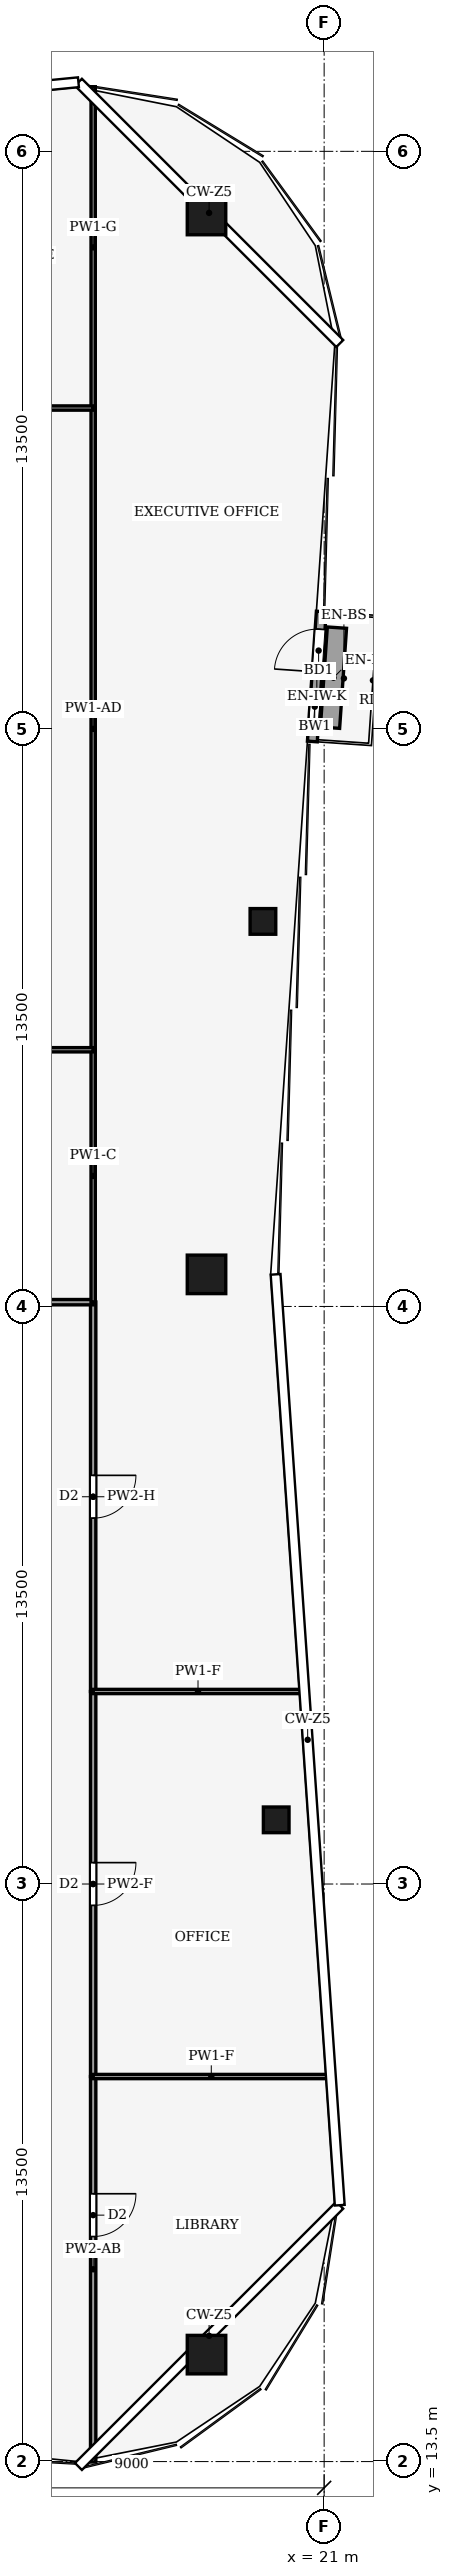
"""IFC4 building model, lengths in metres.
Left out: names, types, materials, properties, quantities, classifications, styles, units other than length and angle.
Written with IfcOpenShell. Run it as: python <this file> out.ifc"""

import sys

from ifc_helpers import new_model, si_unit, direction, frame, frame_2d, origin, origin_2d, place, context, subcontext, project, spatial, rectangle, hollow_rectangle, extrude, element, fill, save


model = new_model("IFC4")
c1 = context("Model", 3, precision=1e-05, world=origin(), true_north=direction((0.0, 1.0)))
c2 = subcontext(c1, "Body", "Model", "MODEL_VIEW")
j1 = project(units=[si_unit("LENGTHUNIT", "METRE"), si_unit("PLANEANGLEUNIT", "RADIAN")], contexts=[c1])
p1 = place(None, origin())
s1 = spatial("IfcSite", under=j1, at=p1, CompositionType="ELEMENT")
p2 = place(p1, origin())
s2 = spatial("IfcBuilding", under=s1, at=p2, CompositionType="ELEMENT")
p3 = place(p2, frame((0.0, 0.0, 322.0)))
s3 = spatial("IfcBuildingStorey", under=s2, at=p3, CompositionType="ELEMENT", Elevation=322.0)
for number, where, z_axis, x_axis in (
    (1, (18.25, 66.0, 0.0), (0.0, 0.0, 1.0), (1.0, 0.0, 0.0)),
    (2, (18.25, 41.25, 0.0), (0.0, 0.0, 1.0), (1.0, 0.0, 0.0)),
    (3, (18.25, 16.0, 0.0), (0.0, 0.0, 1.0), (1.0, 0.0, 0.0)),
):
    element("IfcColumn", number, at=place(p3, frame(where, z_axis=z_axis, x_axis=x_axis)), inside=s3, PredefinedType="COLUMN", context=c2, shape_type="SweptSolid", body=[
        extrude(hollow_rectangle(XDim=0.9, YDim=0.9, WallThickness=0.04, at=origin_2d()), origin(), (0.0, 0.0, 1.0), 4.0),
    ])
for number, where, z_axis, x_axis in (
    (4, (19.879, 28.5, 0.0), (0.0, 0.0, 1.0), (1.0, 0.0, 0.0)),
    (5, (19.569, 49.5, 0.0), (0.0, 0.0, 1.0), (1.0, 0.0, 0.0)),
):
    element("IfcColumn", number, at=place(p3, frame(where, z_axis=z_axis, x_axis=x_axis)), inside=s3, PredefinedType="COLUMN", context=c2, shape_type="SweptSolid", body=[
        extrude(hollow_rectangle(XDim=0.6, YDim=0.6, WallThickness=0.025, at=origin_2d()), origin(), (0.0, 0.0, 1.0), 4.0),
    ])
p4 = place(p3, frame((20.724, 53.706, 0.0), z_axis=(0.0, 0.0, 1.0), x_axis=(0.068802091615, 0.997630328423, 0.0)))
e6 = element("IfcWall", 6, at=p4, inside=s3, PredefinedType="SOLIDWALL", context=c2, shape_type="SweptSolid", body=[
    extrude(rectangle(XDim=3.045, YDim=0.23, at=frame_2d((1.522, 0.0))), origin(), (0.0, 0.0, 1.0), 3.65),
])
p5 = place(p4, frame((1.63, 0.0, 0.0)))
e7 = element("IfcOpeningElement", 7, at=p5, cuts=e6, PredefinedType="OPENING", context=c2, shape_type="SweptSolid", body=[
    extrude(rectangle(XDim=1.0, YDim=2.1, at=frame_2d((0.5, 1.05))), frame((0.0, 0.125, 0.0), z_axis=(0.0, -1.0, 0.0), x_axis=(1.0, 0.0, 0.0)), (0.0, 0.0, 1.0), 0.25),
])
p6 = place(p4, frame((0.415, 0.0, 0.9)))
e8 = element("IfcOpeningElement", 8, at=p6, cuts=e6, PredefinedType="OPENING", context=c2, shape_type="SweptSolid", body=[
    extrude(rectangle(XDim=0.8, YDim=1.2, at=frame_2d((0.4, 0.6))), frame((0.0, 0.125, 0.0), z_axis=(0.0, -1.0, 0.0), x_axis=(1.0, 0.0, 0.0)), (0.0, 0.0, 1.0), 0.25),
])
p7 = place(p3, frame((21.137, 54.028, 0.0), z_axis=(0.0, 0.0, 1.0), x_axis=(0.068827106414, 0.997628602949, 0.0)))
e9 = element("IfcWall", 9, at=p7, inside=s3, PredefinedType="USERDEFINED", context=c2, shape_type="SweptSolid", body=[
    extrude(rectangle(XDim=2.345, YDim=0.45, at=frame_2d((1.172, 0.0))), origin(), (0.0, 0.0, 1.0), 0.4),
])
p8 = place(p3, frame((15.6, 22.5, 0.0), z_axis=(0.0, 0.0, 1.0), x_axis=(0.0, -1.0, 0.0)))
e10 = element("IfcWall", 10, at=p8, inside=s3, PredefinedType="PARTITIONING", context=c2, shape_type="SweptSolid", body=[
    extrude(rectangle(XDim=9.01, YDim=0.125, at=frame_2d((4.505, 0.0))), origin(), (0.0, 0.0, 1.0), 2.93),
])
p9 = place(p8, frame((2.74, 0.0, 0.0)))
e11 = element("IfcOpeningElement", 11, at=p9, cuts=e10, PredefinedType="OPENING", context=c2, shape_type="SweptSolid", body=[
    extrude(rectangle(XDim=1.0, YDim=2.1, at=frame_2d((0.5, 1.05))), frame((0.0, 0.073, 0.0), z_axis=(0.0, -1.0, 0.0), x_axis=(1.0, 0.0, 0.0)), (0.0, 0.0, 1.0), 0.145),
])
p10 = place(p3, frame((15.6, 31.5, 0.0), z_axis=(0.0, 0.0, 1.0), x_axis=(0.0, -1.0, 0.0)))
e12 = element("IfcWall", 12, at=p10, inside=s3, PredefinedType="PARTITIONING", context=c2, shape_type="SweptSolid", body=[
    extrude(rectangle(XDim=9.0, YDim=0.125, at=frame_2d((4.5, 0.0))), origin(), (0.0, 0.0, 1.0), 3.54),
])
p11 = place(p10, frame((4.0, 0.0, 0.0)))
e13 = element("IfcOpeningElement", 13, at=p11, cuts=e12, PredefinedType="OPENING", context=c2, shape_type="SweptSolid", body=[
    extrude(rectangle(XDim=1.0, YDim=2.1, at=frame_2d((0.5, 1.05))), frame((0.0, 0.073, 0.0), z_axis=(0.0, -1.0, 0.0), x_axis=(1.0, 0.0, 0.0)), (0.0, 0.0, 1.0), 0.145),
])
p12 = place(p3, frame((15.6, 40.604, 0.0), z_axis=(0.0, 0.0, 1.0), x_axis=(0.0, -1.0, 0.0)))
e14 = element("IfcWall", 14, at=p12, inside=s3, PredefinedType="PARTITIONING", context=c2, shape_type="SweptSolid", body=[
    extrude(rectangle(XDim=9.104, YDim=0.125, at=frame_2d((4.552, 0.0))), origin(), (0.0, 0.0, 1.0), 3.14),
])
p13 = place(p12, frame((4.052, 0.0, 0.0)))
e15 = element("IfcOpeningElement", 15, at=p13, cuts=e14, PredefinedType="OPENING", context=c2, shape_type="SweptSolid", body=[
    extrude(rectangle(XDim=1.0, YDim=2.1, at=frame_2d((0.5, 1.05))), frame((0.0, 0.073, 0.0), z_axis=(0.0, -1.0, 0.0), x_axis=(1.0, 0.0, 0.0)), (0.0, 0.0, 1.0), 0.145),
])
p14 = place(p3, frame((6.0, 40.6, 0.0), z_axis=(0.0, 0.0, 1.0), x_axis=(1.0, 0.0, 0.0)))
e16 = element("IfcWall", 16, at=p14, inside=s3, PredefinedType="PARTITIONING", context=c2, shape_type="SweptSolid", body=[
    extrude(rectangle(XDim=9.6, YDim=0.125, at=frame_2d((4.8, 0.0))), origin(), (0.0, 0.0, 1.0), 3.39),
])
p15 = place(p14, frame((4.3, 0.0, 0.0)))
e17 = element("IfcOpeningElement", 17, at=p15, cuts=e16, PredefinedType="OPENING", context=c2, shape_type="SweptSolid", body=[
    extrude(rectangle(XDim=1.0, YDim=2.1, at=frame_2d((0.5, 1.05))), frame((0.0, 0.073, 0.0), z_axis=(0.0, -1.0, 0.0), x_axis=(1.0, 0.0, 0.0)), (0.0, 0.0, 1.0), 0.145),
])
p16 = place(p3, frame((21.123, 22.5, 0.0), z_axis=(0.0, 0.0, 1.0), x_axis=(-1.0, 0.0, 0.0)))
e18 = element("IfcWall", 18, at=p16, inside=s3, PredefinedType="PARTITIONING", context=c2, shape_type="SweptSolid", body=[
    extrude(rectangle(XDim=5.523, YDim=0.1, at=frame_2d((2.761, 0.0))), origin(), (0.0, 0.0, 1.0), 3.04),
])
p17 = place(p3, frame((20.502, 31.5, 0.0), z_axis=(0.0, 0.0, 1.0), x_axis=(-1.0, 0.0, 0.0)))
e19 = element("IfcWall", 19, at=p17, inside=s3, PredefinedType="PARTITIONING", context=c2, shape_type="SweptSolid", body=[
    extrude(rectangle(XDim=4.902, YDim=0.1, at=frame_2d((2.451, 0.0))), origin(), (0.0, 0.0, 1.0), 3.04),
])
p18 = place(p3, frame((15.6, 46.5, 0.0), z_axis=(0.0, 0.0, 1.0), x_axis=(0.0, -1.0, 0.0)))
e20 = element("IfcWall", 20, at=p18, inside=s3, PredefinedType="PARTITIONING", context=c2, shape_type="SweptSolid", body=[
    extrude(rectangle(XDim=5.9, YDim=0.1, at=frame_2d((2.95, 0.0))), origin(), (0.0, 0.0, 1.0), 3.87),
])
p19 = place(p3, frame((15.6, 61.5, 0.0), z_axis=(0.0, 0.0, 1.0), x_axis=(0.0, -1.0, 0.0)))
e21 = element("IfcWall", 21, at=p19, inside=s3, PredefinedType="PARTITIONING", context=c2, shape_type="SweptSolid", body=[
    extrude(rectangle(XDim=15.0, YDim=0.1, at=frame_2d((7.5, 0.0))), origin(), (0.0, 0.0, 1.0), 3.35),
])
p20 = place(p3, frame((15.6, 69.01, 0.0), z_axis=(0.0, 0.0, 1.0), x_axis=(0.0, -1.0, 0.0)))
e22 = element("IfcWall", 22, at=p20, inside=s3, PredefinedType="PARTITIONING", context=c2, shape_type="SweptSolid", body=[
    extrude(rectangle(XDim=7.51, YDim=0.1, at=frame_2d((3.755, 0.0))), origin(), (0.0, 0.0, 1.0), 2.93),
])
p21 = place(p3, frame((15.6, 46.5, 0.0), z_axis=(0.0, 0.0, 1.0), x_axis=(-1.0, 0.0, 0.0)))
e23 = element("IfcWall", 23, at=p21, inside=s3, PredefinedType="PARTITIONING", context=c2, shape_type="SweptSolid", body=[
    extrude(rectangle(XDim=9.604, YDim=0.1, at=frame_2d((4.802, 0.0))), origin(), (0.0, 0.0, 1.0), 3.39),
])
p22 = place(p3, frame((6.0, 61.5, 0.0), z_axis=(0.0, 0.0, 1.0), x_axis=(1.0, 0.0, 0.0)))
e24 = element("IfcWall", 24, at=p22, inside=s3, PredefinedType="PARTITIONING", context=c2, shape_type="SweptSolid", body=[
    extrude(rectangle(XDim=9.6, YDim=0.1, at=frame_2d((4.8, 0.0))), origin(), (0.0, 0.0, 1.0), 3.24),
])
p23 = place(p22, frame((4.3, 0.0, 0.0)))
e25 = element("IfcOpeningElement", 25, at=p23, cuts=e24, PredefinedType="OPENING", context=c2, shape_type="SweptSolid", body=[
    extrude(rectangle(XDim=1.0, YDim=2.1, at=frame_2d((0.5, 1.05))), frame((0.0, 0.06, 0.0), z_axis=(0.0, -1.0, 0.0), x_axis=(1.0, 0.0, 0.0)), (0.0, 0.0, 1.0), 0.12),
])
p24 = place(p5, origin())
e26 = element("IfcDoor", 26, at=p24, inside=s3, OperationType="SINGLE_SWING_RIGHT", PredefinedType="DOOR", context=c2, shape_type="SweptSolid", body=[
    extrude(rectangle(XDim=1.0, YDim=2.1, at=frame_2d((0.5, 1.05))), frame((0.0, 0.025, 0.0), z_axis=(0.0, -1.0, 0.0), x_axis=(1.0, 0.0, 0.0)), (0.0, 0.0, 1.0), 0.05),
])
fill(e7, e26)
p25 = place(p6, origin())
e27 = element("IfcWindow", 27, at=p25, inside=s3, PartitioningType="SINGLE_PANEL", PredefinedType="WINDOW", context=c2, shape_type="SweptSolid", body=[
    extrude(rectangle(XDim=0.8, YDim=1.2, at=frame_2d((0.4, 0.6))), frame((0.0, 0.03, 0.0), z_axis=(0.0, -1.0, 0.0), x_axis=(1.0, 0.0, 0.0)), (0.0, 0.0, 1.0), 0.06),
])
fill(e8, e27)
p26 = place(p9, origin())
e28 = element("IfcDoor", 28, at=p26, inside=s3, OperationType="SINGLE_SWING_LEFT", PredefinedType="DOOR", context=c2, shape_type="SweptSolid", body=[
    extrude(rectangle(XDim=1.0, YDim=2.1, at=frame_2d((0.5, 1.05))), frame((0.0, 0.025, 0.0), z_axis=(0.0, -1.0, 0.0), x_axis=(1.0, 0.0, 0.0)), (0.0, 0.0, 1.0), 0.05),
])
fill(e11, e28)
p27 = place(p11, origin())
e29 = element("IfcDoor", 29, at=p27, inside=s3, OperationType="SINGLE_SWING_RIGHT", PredefinedType="DOOR", context=c2, shape_type="SweptSolid", body=[
    extrude(rectangle(XDim=1.0, YDim=2.1, at=frame_2d((0.5, 1.05))), frame((0.0, 0.025, 0.0), z_axis=(0.0, -1.0, 0.0), x_axis=(1.0, 0.0, 0.0)), (0.0, 0.0, 1.0), 0.05),
])
fill(e13, e29)
p28 = place(p13, origin())
e30 = element("IfcDoor", 30, at=p28, inside=s3, OperationType="SINGLE_SWING_LEFT", PredefinedType="DOOR", context=c2, shape_type="SweptSolid", body=[
    extrude(rectangle(XDim=1.0, YDim=2.1, at=frame_2d((0.5, 1.05))), frame((0.0, 0.025, 0.0), z_axis=(0.0, -1.0, 0.0), x_axis=(1.0, 0.0, 0.0)), (0.0, 0.0, 1.0), 0.05),
])
fill(e15, e30)
save(model, sys.argv[1])
